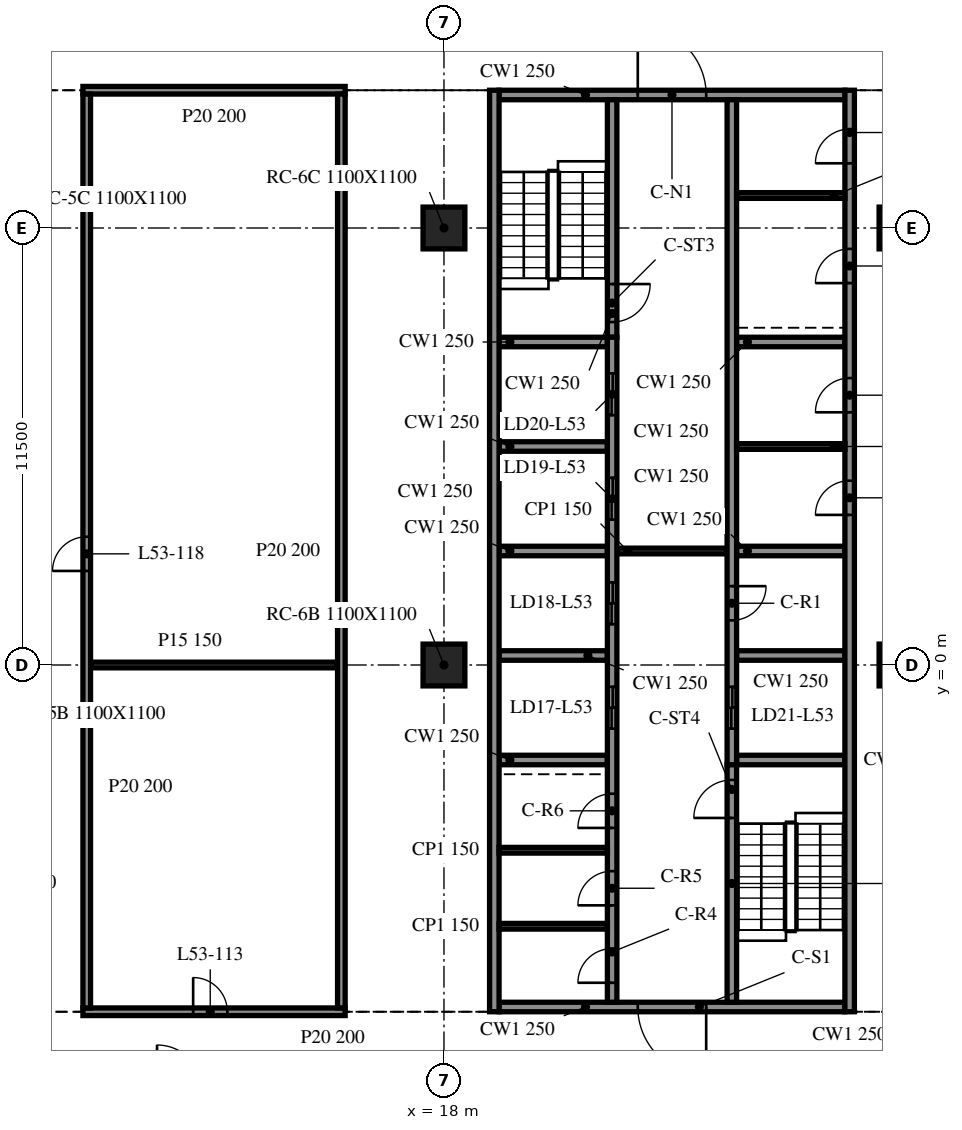
"""IFC4 building model, lengths in metres.
Left out: names, types, materials, properties, quantities, classifications, styles, units other than length and angle.
Written with IfcOpenShell. Run it as: python <this file> out.ifc"""

import sys

from ifc_helpers import new_model, si_unit, direction, frame, frame_2d, origin, origin_2d, place, context, subcontext, project, spatial, rectangle, extrude, element, fill, save


model = new_model("IFC4")
c1 = context("Model", 3, precision=1e-05, world=origin(), true_north=direction((0.0, 1.0)))
c2 = subcontext(c1, "Body", "Model", "MODEL_VIEW")
j1 = project(units=[si_unit("LENGTHUNIT", "METRE"), si_unit("PLANEANGLEUNIT", "RADIAN")], contexts=[c1])
p1 = place(None, origin())
s1 = spatial("IfcSite", under=j1, at=p1, CompositionType="ELEMENT")
p2 = place(p1, origin())
s2 = spatial("IfcBuilding", under=s1, at=p2, CompositionType="ELEMENT")
p3 = place(p2, frame((0.0, 0.0, 220.5)))
s3 = spatial("IfcBuildingStorey", under=s2, at=p3, CompositionType="ELEMENT", Elevation=220.5)
for number, where, z_axis, x_axis in (
    (1, (18.0, 0.0, -0.34), (0.0, 0.0, 1.0), (1.0, 0.0, 0.0)),
    (2, (18.0, 11.5, -0.34), (0.0, 0.0, 1.0), (1.0, 0.0, 0.0)),
    (3, (30.0, 0.0, -0.34), (0.0, 0.0, 1.0), (1.0, 0.0, 0.0)),
    (4, (30.0, 11.5, -0.34), (0.0, 0.0, 1.0), (1.0, 0.0, 0.0)),
):
    element("IfcColumn", number, at=place(p3, frame(where, z_axis=z_axis, x_axis=x_axis)), inside=s3, PredefinedType="COLUMN", context=c2, shape_type="SweptSolid", body=[
        extrude(rectangle(XDim=1.1, YDim=1.1, at=origin_2d()), origin(), (0.0, 0.0, 1.0), 3.74),
    ])
p4 = place(p3, frame((19.325, 15.125, 0.0), z_axis=(0.0, 0.0, 1.0), x_axis=(0.0, -1.0, 0.0)))
e5 = element("IfcWall", 5, at=p4, inside=s3, PredefinedType="SOLIDWALL", context=c2, shape_type="SweptSolid", body=[
    extrude(rectangle(XDim=24.25, YDim=0.25, at=frame_2d((12.125, 0.0))), origin(), (0.0, 0.0, 1.0), 3.4),
])
p5 = place(p3, frame((28.675, -9.125, 0.0), z_axis=(0.0, 0.0, 1.0), x_axis=(0.0, 1.0, 0.0)))
e6 = element("IfcWall", 6, at=p5, inside=s3, PredefinedType="SOLIDWALL", context=c2, shape_type="SweptSolid", body=[
    extrude(rectangle(XDim=24.25, YDim=0.25, at=frame_2d((12.125, 0.0))), origin(), (0.0, 0.0, 1.0), 3.4),
])
p6 = place(p5, frame((13.075, 0.0, 0.0)))
e7 = element("IfcOpeningElement", 7, at=p6, cuts=e6, PredefinedType="OPENING", context=c2, shape_type="SweptSolid", body=[
    extrude(rectangle(XDim=0.9, YDim=2.1, at=frame_2d((0.45, 1.05))), frame((0.0, 0.135, 0.0), z_axis=(0.0, -1.0, 0.0), x_axis=(1.0, 0.0, 0.0)), (0.0, 0.0, 1.0), 0.27),
])
p7 = place(p5, frame((15.775, 0.0, 0.0)))
e8 = element("IfcOpeningElement", 8, at=p7, cuts=e6, PredefinedType="OPENING", context=c2, shape_type="SweptSolid", body=[
    extrude(rectangle(XDim=0.9, YDim=2.1, at=frame_2d((0.45, 1.05))), frame((0.0, 0.135, 0.0), z_axis=(0.0, -1.0, 0.0), x_axis=(1.0, 0.0, 0.0)), (0.0, 0.0, 1.0), 0.27),
])
p8 = place(p5, frame((19.175, 0.0, 0.0)))
e9 = element("IfcOpeningElement", 9, at=p8, cuts=e6, PredefinedType="OPENING", context=c2, shape_type="SweptSolid", body=[
    extrude(rectangle(XDim=0.9, YDim=2.1, at=frame_2d((0.45, 1.05))), frame((0.0, 0.135, 0.0), z_axis=(0.0, -1.0, 0.0), x_axis=(1.0, 0.0, 0.0)), (0.0, 0.0, 1.0), 0.27),
])
p9 = place(p5, frame((22.327, 0.0, 0.0)))
e10 = element("IfcOpeningElement", 10, at=p9, cuts=e6, PredefinedType="OPENING", context=c2, shape_type="SweptSolid", body=[
    extrude(rectangle(XDim=0.9, YDim=2.1, at=frame_2d((0.45, 1.05))), frame((0.0, 0.135, 0.0), z_axis=(0.0, -1.0, 0.0), x_axis=(1.0, 0.0, 0.0)), (0.0, 0.0, 1.0), 0.27),
])
p10 = place(p3, frame((28.55, -9.0, 0.0), z_axis=(0.0, 0.0, 1.0), x_axis=(-1.0, 0.0, 0.0)))
e11 = element("IfcWall", 11, at=p10, inside=s3, PredefinedType="SOLIDWALL", context=c2, shape_type="SweptSolid", body=[
    extrude(rectangle(XDim=9.1, YDim=0.25, at=frame_2d((4.55, 0.0))), origin(), (0.0, 0.0, 1.0), 3.4),
])
p11 = place(p10, frame((3.65, 0.0, 0.0)))
e12 = element("IfcOpeningElement", 12, at=p11, cuts=e11, PredefinedType="OPENING", context=c2, shape_type="SweptSolid", body=[
    extrude(rectangle(XDim=1.8, YDim=2.1, at=frame_2d((0.9, 1.05))), frame((0.0, 0.135, 0.0), z_axis=(0.0, -1.0, 0.0), x_axis=(1.0, 0.0, 0.0)), (0.0, 0.0, 1.0), 0.27),
])
p12 = place(p3, frame((19.45, 15.0, 0.0), z_axis=(0.0, 0.0, 1.0), x_axis=(1.0, 0.0, 0.0)))
e13 = element("IfcWall", 13, at=p12, inside=s3, PredefinedType="SOLIDWALL", context=c2, shape_type="SweptSolid", body=[
    extrude(rectangle(XDim=9.1, YDim=0.25, at=frame_2d((4.55, 0.0))), origin(), (0.0, 0.0, 1.0), 3.4),
])
p13 = place(p12, frame((3.65, 0.0, 0.0)))
e14 = element("IfcOpeningElement", 14, at=p13, cuts=e13, PredefinedType="OPENING", context=c2, shape_type="SweptSolid", body=[
    extrude(rectangle(XDim=1.8, YDim=2.1, at=frame_2d((0.9, 1.05))), frame((0.0, 0.135, 0.0), z_axis=(0.0, -1.0, 0.0), x_axis=(1.0, 0.0, 0.0)), (0.0, 0.0, 1.0), 0.27),
])
p14 = place(p3, frame((22.425, -8.875, 0.0), z_axis=(0.0, 0.0, 1.0), x_axis=(0.0, 1.0, 0.0)))
e15 = element("IfcWall", 15, at=p14, inside=s3, PredefinedType="SOLIDWALL", context=c2, shape_type="SweptSolid", body=[
    extrude(rectangle(XDim=17.5, YDim=0.25, at=frame_2d((8.75, 0.0))), origin(), (0.0, 0.0, 1.0), 3.4),
])
p15 = place(p14, frame((7.2, 0.0, 0.0)))
e16 = element("IfcOpeningElement", 16, at=p15, cuts=e15, PredefinedType="OPENING", context=c2, shape_type="SweptSolid", body=[
    extrude(rectangle(XDim=1.1, YDim=2.1, at=frame_2d((0.55, 1.05))), frame((0.0, 0.135, 0.0), z_axis=(0.0, -1.0, 0.0), x_axis=(1.0, 0.0, 0.0)), (0.0, 0.0, 1.0), 0.27),
])
p16 = place(p14, frame((9.95, 0.0, 0.0)))
e17 = element("IfcOpeningElement", 17, at=p16, cuts=e15, PredefinedType="OPENING", context=c2, shape_type="SweptSolid", body=[
    extrude(rectangle(XDim=1.1, YDim=2.1, at=frame_2d((0.55, 1.05))), frame((0.0, 0.135, 0.0), z_axis=(0.0, -1.0, 0.0), x_axis=(1.0, 0.0, 0.0)), (0.0, 0.0, 1.0), 0.27),
])
p17 = place(p14, frame((12.7, 0.0, 0.0)))
e18 = element("IfcOpeningElement", 18, at=p17, cuts=e15, PredefinedType="OPENING", context=c2, shape_type="SweptSolid", body=[
    extrude(rectangle(XDim=1.1, YDim=2.1, at=frame_2d((0.55, 1.05))), frame((0.0, 0.135, 0.0), z_axis=(0.0, -1.0, 0.0), x_axis=(1.0, 0.0, 0.0)), (0.0, 0.0, 1.0), 0.27),
])
p18 = place(p14, frame((15.45, 0.0, 0.0)))
e19 = element("IfcOpeningElement", 19, at=p18, cuts=e15, PredefinedType="OPENING", context=c2, shape_type="SweptSolid", body=[
    extrude(rectangle(XDim=1.1, YDim=2.1, at=frame_2d((0.55, 1.05))), frame((0.0, 0.135, 0.0), z_axis=(0.0, -1.0, 0.0), x_axis=(1.0, 0.0, 0.0)), (0.0, 0.0, 1.0), 0.27),
])
p19 = place(p14, frame((0.512, 0.0, 0.0)))
e20 = element("IfcOpeningElement", 20, at=p19, cuts=e15, PredefinedType="OPENING", context=c2, shape_type="SweptSolid", body=[
    extrude(rectangle(XDim=0.9, YDim=2.1, at=frame_2d((0.45, 1.05))), frame((0.0, 0.135, 0.0), z_axis=(0.0, -1.0, 0.0), x_axis=(1.0, 0.0, 0.0)), (0.0, 0.0, 1.0), 0.27),
])
p20 = place(p14, frame((2.55, 0.0, 0.0)))
e21 = element("IfcOpeningElement", 21, at=p20, cuts=e15, PredefinedType="OPENING", context=c2, shape_type="SweptSolid", body=[
    extrude(rectangle(XDim=0.9, YDim=2.1, at=frame_2d((0.45, 1.05))), frame((0.0, 0.135, 0.0), z_axis=(0.0, -1.0, 0.0), x_axis=(1.0, 0.0, 0.0)), (0.0, 0.0, 1.0), 0.27),
])
p21 = place(p14, frame((4.587, 0.0, 0.0)))
e22 = element("IfcOpeningElement", 22, at=p21, cuts=e15, PredefinedType="OPENING", context=c2, shape_type="SweptSolid", body=[
    extrude(rectangle(XDim=0.9, YDim=2.1, at=frame_2d((0.45, 1.05))), frame((0.0, 0.135, 0.0), z_axis=(0.0, -1.0, 0.0), x_axis=(1.0, 0.0, 0.0)), (0.0, 0.0, 1.0), 0.27),
])
p22 = place(p3, frame((22.425, 14.875, 0.0), z_axis=(0.0, 0.0, 1.0), x_axis=(0.0, -1.0, 0.0)))
e23 = element("IfcWall", 23, at=p22, inside=s3, PredefinedType="SOLIDWALL", context=c2, shape_type="SweptSolid", body=[
    extrude(rectangle(XDim=6.25, YDim=0.25, at=frame_2d((3.125, 0.0))), origin(), (0.0, 0.0, 1.0), 3.4),
])
p23 = place(p22, frame((4.85, 0.0, 0.0)))
e24 = element("IfcOpeningElement", 24, at=p23, cuts=e23, PredefinedType="OPENING", context=c2, shape_type="SweptSolid", body=[
    extrude(rectangle(XDim=1.0, YDim=2.1, at=frame_2d((0.5, 1.05))), frame((0.0, 0.135, 0.0), z_axis=(0.0, -1.0, 0.0), x_axis=(1.0, 0.0, 0.0)), (0.0, 0.0, 1.0), 0.27),
])
p24 = place(p3, frame((25.575, -8.875, 0.0), z_axis=(0.0, 0.0, 1.0), x_axis=(0.0, 1.0, 0.0)))
e25 = element("IfcWall", 25, at=p24, inside=s3, PredefinedType="SOLIDWALL", context=c2, shape_type="SweptSolid", body=[
    extrude(rectangle(XDim=6.25, YDim=0.25, at=frame_2d((3.125, 0.0))), origin(), (0.0, 0.0, 1.0), 3.4),
])
p25 = place(p24, frame((4.85, 0.0, 0.0)))
e26 = element("IfcOpeningElement", 26, at=p25, cuts=e25, PredefinedType="OPENING", context=c2, shape_type="SweptSolid", body=[
    extrude(rectangle(XDim=1.0, YDim=2.1, at=frame_2d((0.5, 1.05))), frame((0.0, 0.135, 0.0), z_axis=(0.0, -1.0, 0.0), x_axis=(1.0, 0.0, 0.0)), (0.0, 0.0, 1.0), 0.27),
])
p26 = place(p3, frame((25.575, 14.875, 0.0), z_axis=(0.0, 0.0, 1.0), x_axis=(0.0, -1.0, 0.0)))
e27 = element("IfcWall", 27, at=p26, inside=s3, PredefinedType="SOLIDWALL", context=c2, shape_type="SweptSolid", body=[
    extrude(rectangle(XDim=17.5, YDim=0.25, at=frame_2d((8.75, 0.0))), origin(), (0.0, 0.0, 1.0), 3.4),
])
p27 = place(p26, frame((15.45, 0.0, 0.0)))
e28 = element("IfcOpeningElement", 28, at=p27, cuts=e27, PredefinedType="OPENING", context=c2, shape_type="SweptSolid", body=[
    extrude(rectangle(XDim=1.1, YDim=2.1, at=frame_2d((0.55, 1.05))), frame((0.0, 0.135, 0.0), z_axis=(0.0, -1.0, 0.0), x_axis=(1.0, 0.0, 0.0)), (0.0, 0.0, 1.0), 0.27),
])
p28 = place(p26, frame((12.8, 0.0, 0.0)))
e29 = element("IfcOpeningElement", 29, at=p28, cuts=e27, PredefinedType="OPENING", context=c2, shape_type="SweptSolid", body=[
    extrude(rectangle(XDim=0.9, YDim=2.1, at=frame_2d((0.45, 1.05))), frame((0.0, 0.135, 0.0), z_axis=(0.0, -1.0, 0.0), x_axis=(1.0, 0.0, 0.0)), (0.0, 0.0, 1.0), 0.27),
])
for number, where, z_axis, x_axis in (
    (30, (19.45, -2.5, 0.0), (0.0, 0.0, 1.0), (1.0, 0.0, 0.0)),
    (31, (19.45, 0.25, 0.0), (0.0, 0.0, 1.0), (1.0, 0.0, 0.0)),
    (32, (19.45, 3.0, 0.0), (0.0, 0.0, 1.0), (1.0, 0.0, 0.0)),
    (33, (19.45, 5.75, 0.0), (0.0, 0.0, 1.0), (1.0, 0.0, 0.0)),
    (34, (19.45, 8.5, 0.0), (0.0, 0.0, 1.0), (1.0, 0.0, 0.0)),
    (35, (25.7, -2.5, 0.0), (0.0, 0.0, 1.0), (1.0, 0.0, 0.0)),
    (36, (25.7, 0.25, 0.0), (0.0, 0.0, 1.0), (1.0, 0.0, 0.0)),
    (37, (25.7, 3.0, 0.0), (0.0, 0.0, 1.0), (1.0, 0.0, 0.0)),
    (38, (25.7, 8.5, 0.0), (0.0, 0.0, 1.0), (1.0, 0.0, 0.0)),
):
    element("IfcWall", number, at=place(p3, frame(where, z_axis=z_axis, x_axis=x_axis)), inside=s3, PredefinedType="SOLIDWALL", context=c2, shape_type="SweptSolid", body=[
        extrude(rectangle(XDim=2.85, YDim=0.25, at=frame_2d((1.425, 0.0))), origin(), (0.0, 0.0, 1.0), 3.4),
    ])
p29 = place(p3, frame((22.55, 3.0, 0.0), z_axis=(0.0, 0.0, 1.0), x_axis=(1.0, 0.0, 0.0)))
e39 = element("IfcWall", 39, at=p29, inside=s3, PredefinedType="PARTITIONING", context=c2, shape_type="SweptSolid", body=[
    extrude(rectangle(XDim=2.9, YDim=0.15, at=frame_2d((1.45, 0.0))), origin(), (0.0, 0.0, 1.0), 3.4),
])
for number, where, z_axis, x_axis in (
    (40, (25.7, 5.75, 0.0), (0.0, 0.0, 1.0), (1.0, 0.0, 0.0)),
    (41, (19.45, -6.875, 0.0), (0.0, 0.0, 1.0), (1.0, 0.0, 0.0)),
    (42, (19.45, -4.875, 0.0), (0.0, 0.0, 1.0), (1.0, 0.0, 0.0)),
    (43, (25.7, 12.355, 0.0), (0.0, 0.0, 1.0), (1.0, 0.0, 0.0)),
):
    element("IfcWall", number, at=place(p3, frame(where, z_axis=z_axis, x_axis=x_axis)), inside=s3, PredefinedType="PARTITIONING", context=c2, shape_type="SweptSolid", body=[
        extrude(rectangle(XDim=2.85, YDim=0.15, at=frame_2d((1.425, 0.0))), origin(), (0.0, 0.0, 1.0), 3.4),
    ])
p30 = place(p3, frame((8.5, -9.125, 0.0), z_axis=(0.0, 0.0, 1.0), x_axis=(1.0, 0.0, 0.0)))
e44 = element("IfcWall", 44, at=p30, inside=s3, PredefinedType="PARTITIONING", context=c2, shape_type="SweptSolid", body=[
    extrude(rectangle(XDim=6.9, YDim=0.2, at=frame_2d((3.45, 0.0))), origin(), (0.0, 0.0, 1.0), 3.4),
])
p31 = place(p30, frame((2.9, 0.0, 0.0)))
e45 = element("IfcOpeningElement", 45, at=p31, cuts=e44, PredefinedType="OPENING", context=c2, shape_type="SweptSolid", body=[
    extrude(rectangle(XDim=0.9, YDim=2.1, at=frame_2d((0.45, 1.05))), frame((0.0, 0.11, 0.0), z_axis=(0.0, -1.0, 0.0), x_axis=(1.0, 0.0, 0.0)), (0.0, 0.0, 1.0), 0.22),
])
p32 = place(p3, frame((8.7, 0.0, 0.0), z_axis=(0.0, 0.0, 1.0), x_axis=(1.0, 0.0, 0.0)))
e46 = element("IfcWall", 46, at=p32, inside=s3, PredefinedType="PARTITIONING", context=c2, shape_type="SweptSolid", body=[
    extrude(rectangle(XDim=6.5, YDim=0.15, at=frame_2d((3.25, 0.0))), origin(), (0.0, 0.0, 1.0), 3.4),
])
p33 = place(p3, frame((8.5, 15.125, 0.0), z_axis=(0.0, 0.0, 1.0), x_axis=(1.0, 0.0, 0.0)))
e47 = element("IfcWall", 47, at=p33, inside=s3, PredefinedType="PARTITIONING", context=c2, shape_type="SweptSolid", body=[
    extrude(rectangle(XDim=6.9, YDim=0.2, at=frame_2d((3.45, 0.0))), origin(), (0.0, 0.0, 1.0), 3.4),
])
p34 = place(p3, frame((8.6, -9.025, 0.0), z_axis=(0.0, 0.0, 1.0), x_axis=(0.0, 1.0, 0.0)))
e48 = element("IfcWall", 48, at=p34, inside=s3, PredefinedType="PARTITIONING", context=c2, shape_type="SweptSolid", body=[
    extrude(rectangle(XDim=24.05, YDim=0.2, at=frame_2d((12.025, 0.0))), origin(), (0.0, 0.0, 1.0), 3.4),
])
p35 = place(p34, frame((11.5, 0.0, 0.0)))
e49 = element("IfcOpeningElement", 49, at=p35, cuts=e48, PredefinedType="OPENING", context=c2, shape_type="SweptSolid", body=[
    extrude(rectangle(XDim=0.9, YDim=2.1, at=frame_2d((0.45, 1.05))), frame((0.0, 0.11, 0.0), z_axis=(0.0, -1.0, 0.0), x_axis=(1.0, 0.0, 0.0)), (0.0, 0.0, 1.0), 0.22),
])
p36 = place(p3, frame((15.3, -9.025, 0.0), z_axis=(0.0, 0.0, 1.0), x_axis=(0.0, 1.0, 0.0)))
e50 = element("IfcWall", 50, at=p36, inside=s3, PredefinedType="PARTITIONING", context=c2, shape_type="SweptSolid", body=[
    extrude(rectangle(XDim=24.05, YDim=0.2, at=frame_2d((12.025, 0.0))), origin(), (0.0, 0.0, 1.0), 3.4),
])
p37 = place(p11, origin())
e51 = element("IfcDoor", 51, at=p37, inside=s3, OperationType="DOUBLE_DOOR_SINGLE_SWING", PredefinedType="DOOR", context=c2, shape_type="SweptSolid", body=[
    extrude(rectangle(XDim=1.8, YDim=2.1, at=frame_2d((0.9, 1.05))), frame((0.0, 0.025, 0.0), z_axis=(0.0, -1.0, 0.0), x_axis=(1.0, 0.0, 0.0)), (0.0, 0.0, 1.0), 0.05),
])
fill(e12, e51)
p38 = place(p13, origin())
e52 = element("IfcDoor", 52, at=p38, inside=s3, OperationType="DOUBLE_DOOR_SINGLE_SWING", PredefinedType="DOOR", context=c2, shape_type="SweptSolid", body=[
    extrude(rectangle(XDim=1.8, YDim=2.1, at=frame_2d((0.9, 1.05))), frame((0.0, 0.025, 0.0), z_axis=(0.0, -1.0, 0.0), x_axis=(1.0, 0.0, 0.0)), (0.0, 0.0, 1.0), 0.05),
])
fill(e14, e52)
p39 = place(p27, origin())
e53 = element("IfcDoor", 53, at=p39, inside=s3, OperationType="DOUBLE_DOOR_SLIDING", PredefinedType="DOOR", context=c2, shape_type="SweptSolid", body=[
    extrude(rectangle(XDim=1.1, YDim=2.1, at=frame_2d((0.55, 1.05))), frame((0.0, 0.025, 0.0), z_axis=(0.0, -1.0, 0.0), x_axis=(1.0, 0.0, 0.0)), (0.0, 0.0, 1.0), 0.05),
])
fill(e28, e53)
p40 = place(p15, origin())
e54 = element("IfcDoor", 54, at=p40, inside=s3, OperationType="DOUBLE_DOOR_SLIDING", PredefinedType="DOOR", context=c2, shape_type="SweptSolid", body=[
    extrude(rectangle(XDim=1.1, YDim=2.1, at=frame_2d((0.55, 1.05))), frame((0.0, 0.025, 0.0), z_axis=(0.0, -1.0, 0.0), x_axis=(1.0, 0.0, 0.0)), (0.0, 0.0, 1.0), 0.05),
])
fill(e16, e54)
p41 = place(p16, origin())
e55 = element("IfcDoor", 55, at=p41, inside=s3, OperationType="DOUBLE_DOOR_SLIDING", PredefinedType="DOOR", context=c2, shape_type="SweptSolid", body=[
    extrude(rectangle(XDim=1.1, YDim=2.1, at=frame_2d((0.55, 1.05))), frame((0.0, 0.025, 0.0), z_axis=(0.0, -1.0, 0.0), x_axis=(1.0, 0.0, 0.0)), (0.0, 0.0, 1.0), 0.05),
])
fill(e17, e55)
p42 = place(p17, origin())
e56 = element("IfcDoor", 56, at=p42, inside=s3, OperationType="DOUBLE_DOOR_SLIDING", PredefinedType="DOOR", context=c2, shape_type="SweptSolid", body=[
    extrude(rectangle(XDim=1.1, YDim=2.1, at=frame_2d((0.55, 1.05))), frame((0.0, 0.025, 0.0), z_axis=(0.0, -1.0, 0.0), x_axis=(1.0, 0.0, 0.0)), (0.0, 0.0, 1.0), 0.05),
])
fill(e18, e56)
p43 = place(p18, origin())
e57 = element("IfcDoor", 57, at=p43, inside=s3, OperationType="DOUBLE_DOOR_SLIDING", PredefinedType="DOOR", context=c2, shape_type="SweptSolid", body=[
    extrude(rectangle(XDim=1.1, YDim=2.1, at=frame_2d((0.55, 1.05))), frame((0.0, 0.025, 0.0), z_axis=(0.0, -1.0, 0.0), x_axis=(1.0, 0.0, 0.0)), (0.0, 0.0, 1.0), 0.05),
])
fill(e19, e57)
p44 = place(p28, origin())
e58 = element("IfcDoor", 58, at=p44, inside=s3, OperationType="SINGLE_SWING_LEFT", PredefinedType="DOOR", context=c2, shape_type="SweptSolid", body=[
    extrude(rectangle(XDim=0.9, YDim=2.1, at=frame_2d((0.45, 1.05))), frame((0.0, 0.025, 0.0), z_axis=(0.0, -1.0, 0.0), x_axis=(1.0, 0.0, 0.0)), (0.0, 0.0, 1.0), 0.05),
])
fill(e29, e58)
p45 = place(p6, origin())
e59 = element("IfcDoor", 59, at=p45, inside=s3, OperationType="SINGLE_SWING_RIGHT", PredefinedType="DOOR", context=c2, shape_type="SweptSolid", body=[
    extrude(rectangle(XDim=0.9, YDim=2.1, at=frame_2d((0.45, 1.05))), frame((0.0, 0.025, 0.0), z_axis=(0.0, -1.0, 0.0), x_axis=(1.0, 0.0, 0.0)), (0.0, 0.0, 1.0), 0.05),
])
fill(e7, e59)
p46 = place(p7, origin())
e60 = element("IfcDoor", 60, at=p46, inside=s3, OperationType="SINGLE_SWING_LEFT", PredefinedType="DOOR", context=c2, shape_type="SweptSolid", body=[
    extrude(rectangle(XDim=0.9, YDim=2.1, at=frame_2d((0.45, 1.05))), frame((0.0, 0.025, 0.0), z_axis=(0.0, -1.0, 0.0), x_axis=(1.0, 0.0, 0.0)), (0.0, 0.0, 1.0), 0.05),
])
fill(e8, e60)
p47 = place(p19, origin())
e61 = element("IfcDoor", 61, at=p47, inside=s3, OperationType="SINGLE_SWING_RIGHT", PredefinedType="DOOR", context=c2, shape_type="SweptSolid", body=[
    extrude(rectangle(XDim=0.9, YDim=2.1, at=frame_2d((0.45, 1.05))), frame((0.0, 0.025, 0.0), z_axis=(0.0, -1.0, 0.0), x_axis=(1.0, 0.0, 0.0)), (0.0, 0.0, 1.0), 0.05),
])
fill(e20, e61)
p48 = place(p20, origin())
e62 = element("IfcDoor", 62, at=p48, inside=s3, OperationType="SINGLE_SWING_LEFT", PredefinedType="DOOR", context=c2, shape_type="SweptSolid", body=[
    extrude(rectangle(XDim=0.9, YDim=2.1, at=frame_2d((0.45, 1.05))), frame((0.0, 0.025, 0.0), z_axis=(0.0, -1.0, 0.0), x_axis=(1.0, 0.0, 0.0)), (0.0, 0.0, 1.0), 0.05),
])
fill(e21, e62)
p49 = place(p21, origin())
e63 = element("IfcDoor", 63, at=p49, inside=s3, OperationType="SINGLE_SWING_RIGHT", PredefinedType="DOOR", context=c2, shape_type="SweptSolid", body=[
    extrude(rectangle(XDim=0.9, YDim=2.1, at=frame_2d((0.45, 1.05))), frame((0.0, 0.025, 0.0), z_axis=(0.0, -1.0, 0.0), x_axis=(1.0, 0.0, 0.0)), (0.0, 0.0, 1.0), 0.05),
])
fill(e22, e63)
p50 = place(p8, origin())
e64 = element("IfcDoor", 64, at=p50, inside=s3, OperationType="SINGLE_SWING_LEFT", PredefinedType="DOOR", context=c2, shape_type="SweptSolid", body=[
    extrude(rectangle(XDim=0.9, YDim=2.1, at=frame_2d((0.45, 1.05))), frame((0.0, 0.025, 0.0), z_axis=(0.0, -1.0, 0.0), x_axis=(1.0, 0.0, 0.0)), (0.0, 0.0, 1.0), 0.05),
])
fill(e9, e64)
p51 = place(p9, origin())
e65 = element("IfcDoor", 65, at=p51, inside=s3, OperationType="SINGLE_SWING_RIGHT", PredefinedType="DOOR", context=c2, shape_type="SweptSolid", body=[
    extrude(rectangle(XDim=0.9, YDim=2.1, at=frame_2d((0.45, 1.05))), frame((0.0, 0.025, 0.0), z_axis=(0.0, -1.0, 0.0), x_axis=(1.0, 0.0, 0.0)), (0.0, 0.0, 1.0), 0.05),
])
fill(e10, e65)
p52 = place(p23, origin())
e66 = element("IfcDoor", 66, at=p52, inside=s3, OperationType="SINGLE_SWING_LEFT", PredefinedType="DOOR", context=c2, shape_type="SweptSolid", body=[
    extrude(rectangle(XDim=1.0, YDim=2.1, at=frame_2d((0.5, 1.05))), frame((0.0, 0.025, 0.0), z_axis=(0.0, -1.0, 0.0), x_axis=(1.0, 0.0, 0.0)), (0.0, 0.0, 1.0), 0.05),
])
fill(e24, e66)
p53 = place(p25, origin())
e67 = element("IfcDoor", 67, at=p53, inside=s3, OperationType="SINGLE_SWING_RIGHT", PredefinedType="DOOR", context=c2, shape_type="SweptSolid", body=[
    extrude(rectangle(XDim=1.0, YDim=2.1, at=frame_2d((0.5, 1.05))), frame((0.0, 0.025, 0.0), z_axis=(0.0, -1.0, 0.0), x_axis=(1.0, 0.0, 0.0)), (0.0, 0.0, 1.0), 0.05),
])
fill(e26, e67)
p54 = place(p31, origin())
e68 = element("IfcDoor", 68, at=p54, inside=s3, OperationType="SINGLE_SWING_LEFT", PredefinedType="DOOR", context=c2, shape_type="SweptSolid", body=[
    extrude(rectangle(XDim=0.9, YDim=2.1, at=frame_2d((0.45, 1.05))), frame((0.0, 0.025, 0.0), z_axis=(0.0, -1.0, 0.0), x_axis=(1.0, 0.0, 0.0)), (0.0, 0.0, 1.0), 0.05),
])
fill(e45, e68)
p55 = place(p35, origin())
e69 = element("IfcDoor", 69, at=p55, inside=s3, OperationType="SINGLE_SWING_RIGHT", PredefinedType="DOOR", context=c2, shape_type="SweptSolid", body=[
    extrude(rectangle(XDim=0.9, YDim=2.1, at=frame_2d((0.45, 1.05))), frame((0.0, 0.025, 0.0), z_axis=(0.0, -1.0, 0.0), x_axis=(1.0, 0.0, 0.0)), (0.0, 0.0, 1.0), 0.05),
])
fill(e49, e69)
save(model, sys.argv[1])
